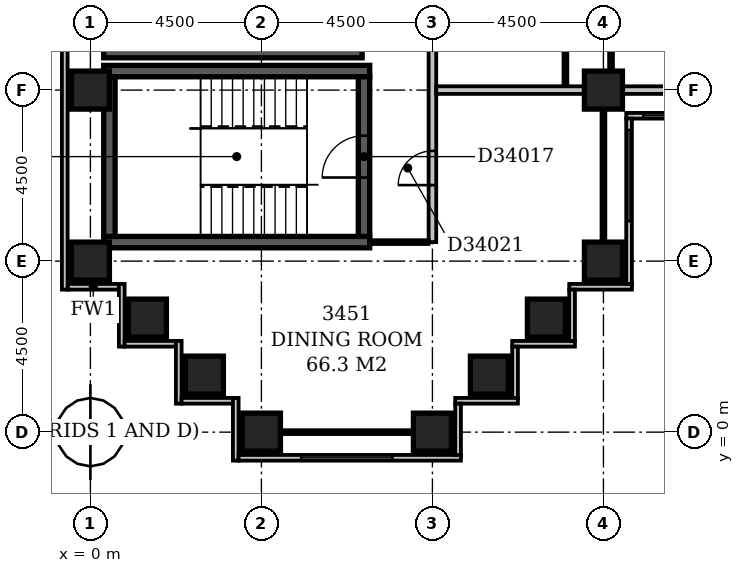
"""IFC4 building model, lengths in metres.
Left out: names, types, materials, properties, quantities, classifications, styles, units other than length and angle.
Written with IfcOpenShell. Run it as: python <this file> out.ifc"""

import sys

from ifc_helpers import new_model, si_unit, direction, frame, frame_2d, origin, origin_2d, place, context, subcontext, project, spatial, rectangle, extrude, element, fill, save


model = new_model("IFC4")
c1 = context("Model", 3, precision=1e-05, world=origin(), true_north=direction((0.0, 1.0)))
c2 = subcontext(c1, "Body", "Model", "MODEL_VIEW")
j1 = project(units=[si_unit("LENGTHUNIT", "METRE"), si_unit("PLANEANGLEUNIT", "RADIAN")], contexts=[c1])
p1 = place(None, origin())
s1 = spatial("IfcSite", under=j1, at=p1, CompositionType="ELEMENT")
p2 = place(p1, origin())
s2 = spatial("IfcBuilding", under=s1, at=p2, CompositionType="ELEMENT")
p3 = place(p2, frame((0.0, 0.0, 137.6)))
s3 = spatial("IfcBuildingStorey", under=s2, at=p3, CompositionType="ELEMENT", Elevation=137.6)
for number, where, z_axis, x_axis in (
    (1, (0.35, 5.0, -0.3), (0.0, 0.0, 1.0), (1.0, 0.0, 0.0)),
    (2, (0.35, 9.5, -0.3), (0.0, 0.0, 1.0), (1.0, 0.0, 0.0)),
):
    element("IfcWall", number, at=place(p3, frame(where, z_axis=z_axis, x_axis=x_axis)), inside=s3, PredefinedType="SHEAR", context=c2, shape_type="SweptSolid", body=[
        extrude(rectangle(XDim=7.0, YDim=0.3, at=frame_2d((3.5, 0.0))), origin(), (0.0, 0.0, 1.0), 3.6),
    ])
p4 = place(p3, frame((0.35, 10.0, -0.3), z_axis=(0.0, 0.0, 1.0), x_axis=(1.0, 0.0, 0.0)))
e3 = element("IfcWall", 3, at=p4, inside=s3, PredefinedType="SHEAR", context=c2, shape_type="SweptSolid", body=[
    extrude(rectangle(XDim=6.8, YDim=0.3, at=frame_2d((3.4, 0.0))), origin(), (0.0, 0.0, 1.0), 3.6),
])
p5 = place(p3, frame((0.5, 5.15, -0.3), z_axis=(0.0, 0.0, 1.0), x_axis=(0.0, 1.0, 0.0)))
e4 = element("IfcWall", 4, at=p5, inside=s3, PredefinedType="SHEAR", context=c2, shape_type="SweptSolid", body=[
    extrude(rectangle(XDim=4.2, YDim=0.3, at=frame_2d((2.1, 0.0))), origin(), (0.0, 0.0, 1.0), 3.6),
])
p6 = place(p3, frame((7.2, 5.15, -0.3), z_axis=(0.0, 0.0, 1.0), x_axis=(0.0, 1.0, 0.0)))
e5 = element("IfcWall", 5, at=p6, inside=s3, PredefinedType="SHEAR", context=c2, shape_type="SweptSolid", body=[
    extrude(rectangle(XDim=4.2, YDim=0.3, at=frame_2d((2.1, 0.0))), origin(), (0.0, 0.0, 1.0), 3.6),
])
p7 = place(p6, frame((1.55, 0.0, 0.3)))
e6 = element("IfcOpeningElement", 6, at=p7, cuts=e5, PredefinedType="OPENING", context=c2, shape_type="SweptSolid", body=[
    extrude(rectangle(XDim=1.1, YDim=2.1, at=frame_2d((0.55, 1.05))), frame((0.0, 0.162, 0.0), z_axis=(0.0, -1.0, 0.0), x_axis=(1.0, 0.0, 0.0)), (0.0, 0.0, 1.0), 0.324),
])
for number, where, z_axis, x_axis in (
    (7, (4.5, 0.0, -0.3), (0.0, 0.0, 1.0), (1.0, 0.0, 0.0)),
    (8, (9.0, 0.0, -0.3), (0.0, 0.0, 1.0), (1.0, 0.0, 0.0)),
    (9, (3.0, 1.5, -0.3), (0.0, 0.0, 1.0), (1.0, 0.0, 0.0)),
    (10, (10.5, 1.5, -0.3), (0.0, 0.0, 1.0), (1.0, 0.0, 0.0)),
    (11, (1.5, 3.0, -0.3), (0.0, 0.0, 1.0), (1.0, 0.0, 0.0)),
    (12, (12.0, 3.0, -0.3), (0.0, 0.0, 1.0), (1.0, 0.0, 0.0)),
    (13, (0.0, 4.5, -0.3), (0.0, 0.0, 1.0), (1.0, 0.0, 0.0)),
    (14, (13.5, 4.5, -0.3), (0.0, 0.0, 1.0), (1.0, 0.0, 0.0)),
    (15, (0.0, 9.0, -0.3), (0.0, 0.0, 1.0), (1.0, 0.0, 0.0)),
    (16, (13.5, 9.0, -0.3), (0.0, 0.0, 1.0), (1.0, 0.0, 0.0)),
):
    element("IfcColumn", number, at=place(p3, frame(where, z_axis=z_axis, x_axis=x_axis)), inside=s3, PredefinedType="COLUMN", context=c2, shape_type="SweptSolid", body=[
        extrude(rectangle(XDim=1.0, YDim=1.0, at=origin_2d()), origin(), (0.0, 0.0, 1.0), 3.6),
    ])
p8 = place(p3, frame((9.675, -0.6, 0.0), z_axis=(0.0, 0.0, 1.0), x_axis=(0.0, 1.0, 0.0)))
e17 = element("IfcWall", 17, at=p8, inside=s3, PredefinedType="STANDARD", context=c2, shape_type="SweptSolid", body=[
    extrude(rectangle(XDim=1.35, YDim=0.15, at=frame_2d((0.675, 0.0))), origin(), (0.0, 0.0, 1.0), 2.7),
])
p9 = place(p3, frame((9.6, 0.825, 0.0), z_axis=(0.0, 0.0, 1.0), x_axis=(1.0, 0.0, 0.0)))
e18 = element("IfcWall", 18, at=p9, inside=s3, PredefinedType="STANDARD", context=c2, shape_type="SweptSolid", body=[
    extrude(rectangle(XDim=1.65, YDim=0.15, at=frame_2d((0.825, 0.0))), origin(), (0.0, 0.0, 1.0), 2.7),
])
p10 = place(p3, frame((11.175, 0.9, 0.0), z_axis=(0.0, 0.0, 1.0), x_axis=(0.0, 1.0, 0.0)))
e19 = element("IfcWall", 19, at=p10, inside=s3, PredefinedType="STANDARD", context=c2, shape_type="SweptSolid", body=[
    extrude(rectangle(XDim=1.35, YDim=0.15, at=frame_2d((0.675, 0.0))), origin(), (0.0, 0.0, 1.0), 2.7),
])
p11 = place(p3, frame((11.1, 2.325, 0.0), z_axis=(0.0, 0.0, 1.0), x_axis=(1.0, 0.0, 0.0)))
e20 = element("IfcWall", 20, at=p11, inside=s3, PredefinedType="STANDARD", context=c2, shape_type="SweptSolid", body=[
    extrude(rectangle(XDim=1.65, YDim=0.15, at=frame_2d((0.825, 0.0))), origin(), (0.0, 0.0, 1.0), 2.7),
])
p12 = place(p3, frame((12.675, 2.4, 0.0), z_axis=(0.0, 0.0, 1.0), x_axis=(0.0, 1.0, 0.0)))
e21 = element("IfcWall", 21, at=p12, inside=s3, PredefinedType="STANDARD", context=c2, shape_type="SweptSolid", body=[
    extrude(rectangle(XDim=1.35, YDim=0.15, at=frame_2d((0.675, 0.0))), origin(), (0.0, 0.0, 1.0), 2.7),
])
p13 = place(p3, frame((12.6, 3.825, 0.0), z_axis=(0.0, 0.0, 1.0), x_axis=(1.0, 0.0, 0.0)))
e22 = element("IfcWall", 22, at=p13, inside=s3, PredefinedType="STANDARD", context=c2, shape_type="SweptSolid", body=[
    extrude(rectangle(XDim=1.65, YDim=0.15, at=frame_2d((0.825, 0.0))), origin(), (0.0, 0.0, 1.0), 2.7),
])
p14 = place(p3, frame((14.175, 3.9, 0.0), z_axis=(0.0, 0.0, 1.0), x_axis=(0.0, 1.0, 0.0)))
e23 = element("IfcWall", 23, at=p14, inside=s3, PredefinedType="STANDARD", context=c2, shape_type="SweptSolid", body=[
    extrude(rectangle(XDim=4.35, YDim=0.15, at=frame_2d((2.175, 0.0))), origin(), (0.0, 0.0, 1.0), 2.7),
])
p15 = place(p14, frame((1.65, 0.0, 0.6)))
e24 = element("IfcOpeningElement", 24, at=p15, cuts=e23, PredefinedType="OPENING", context=c2, shape_type="SweptSolid", body=[
    extrude(rectangle(XDim=2.4, YDim=1.8, at=frame_2d((1.2, 0.9))), frame((0.0, 0.087, 0.0), z_axis=(0.0, -1.0, 0.0), x_axis=(1.0, 0.0, 0.0)), (0.0, 0.0, 1.0), 0.174),
])
p16 = place(p3, frame((14.1, 8.325, 0.0), z_axis=(0.0, 0.0, 1.0), x_axis=(1.0, 0.0, 0.0)))
e25 = element("IfcWall", 25, at=p16, inside=s3, PredefinedType="STANDARD", context=c2, shape_type="SweptSolid", body=[
    extrude(rectangle(XDim=4.65, YDim=0.15, at=frame_2d((2.325, 0.0))), origin(), (0.0, 0.0, 1.0), 2.7),
])
p17 = place(p16, frame((0.45, 0.0, 0.6)))
e26 = element("IfcOpeningElement", 26, at=p17, cuts=e25, PredefinedType="OPENING", context=c2, shape_type="SweptSolid", body=[
    extrude(rectangle(XDim=2.4, YDim=1.8, at=frame_2d((1.2, 0.9))), frame((0.0, 0.087, 0.0), z_axis=(0.0, -1.0, 0.0), x_axis=(1.0, 0.0, 0.0)), (0.0, 0.0, 1.0), 0.174),
])
p18 = place(p3, frame((-0.675, 59.1, 0.0), z_axis=(0.0, 0.0, 1.0), x_axis=(0.0, -1.0, 0.0)))
e27 = element("IfcWall", 27, at=p18, inside=s3, PredefinedType="STANDARD", context=c2, shape_type="SweptSolid", body=[
    extrude(rectangle(XDim=55.35, YDim=0.15, at=frame_2d((27.675, 0.0))), origin(), (0.0, 0.0, 1.0), 2.7),
])
p19 = place(p3, frame((-0.6, 3.825, 0.0), z_axis=(0.0, 0.0, 1.0), x_axis=(1.0, 0.0, 0.0)))
e28 = element("IfcWall", 28, at=p19, inside=s3, PredefinedType="STANDARD", context=c2, shape_type="SweptSolid", body=[
    extrude(rectangle(XDim=1.35, YDim=0.15, at=frame_2d((0.675, 0.0))), origin(), (0.0, 0.0, 1.0), 2.7),
])
p20 = place(p3, frame((0.825, 3.9, 0.0), z_axis=(0.0, 0.0, 1.0), x_axis=(0.0, -1.0, 0.0)))
e29 = element("IfcWall", 29, at=p20, inside=s3, PredefinedType="STANDARD", context=c2, shape_type="SweptSolid", body=[
    extrude(rectangle(XDim=1.65, YDim=0.15, at=frame_2d((0.825, 0.0))), origin(), (0.0, 0.0, 1.0), 2.7),
])
p21 = place(p3, frame((0.9, 2.325, 0.0), z_axis=(0.0, 0.0, 1.0), x_axis=(1.0, 0.0, 0.0)))
e30 = element("IfcWall", 30, at=p21, inside=s3, PredefinedType="STANDARD", context=c2, shape_type="SweptSolid", body=[
    extrude(rectangle(XDim=1.35, YDim=0.15, at=frame_2d((0.675, 0.0))), origin(), (0.0, 0.0, 1.0), 2.7),
])
p22 = place(p3, frame((2.325, 2.4, 0.0), z_axis=(0.0, 0.0, 1.0), x_axis=(0.0, -1.0, 0.0)))
e31 = element("IfcWall", 31, at=p22, inside=s3, PredefinedType="STANDARD", context=c2, shape_type="SweptSolid", body=[
    extrude(rectangle(XDim=1.65, YDim=0.15, at=frame_2d((0.825, 0.0))), origin(), (0.0, 0.0, 1.0), 2.7),
])
p23 = place(p3, frame((2.4, 0.825, 0.0), z_axis=(0.0, 0.0, 1.0), x_axis=(1.0, 0.0, 0.0)))
e32 = element("IfcWall", 32, at=p23, inside=s3, PredefinedType="STANDARD", context=c2, shape_type="SweptSolid", body=[
    extrude(rectangle(XDim=1.35, YDim=0.15, at=frame_2d((0.675, 0.0))), origin(), (0.0, 0.0, 1.0), 2.7),
])
p24 = place(p3, frame((3.825, 0.9, 0.0), z_axis=(0.0, 0.0, 1.0), x_axis=(0.0, -1.0, 0.0)))
e33 = element("IfcWall", 33, at=p24, inside=s3, PredefinedType="STANDARD", context=c2, shape_type="SweptSolid", body=[
    extrude(rectangle(XDim=1.65, YDim=0.15, at=frame_2d((0.825, 0.0))), origin(), (0.0, 0.0, 1.0), 2.7),
])
p25 = place(p3, frame((3.9, -0.675, 0.0), z_axis=(0.0, 0.0, 1.0), x_axis=(1.0, 0.0, 0.0)))
e34 = element("IfcWall", 34, at=p25, inside=s3, PredefinedType="STANDARD", context=c2, shape_type="SweptSolid", body=[
    extrude(rectangle(XDim=5.85, YDim=0.15, at=frame_2d((2.925, 0.0))), origin(), (0.0, 0.0, 1.0), 2.7),
])
p26 = place(p25, frame((1.65, 0.0, 0.6)))
e35 = element("IfcOpeningElement", 35, at=p26, cuts=e34, PredefinedType="OPENING", context=c2, shape_type="SweptSolid", body=[
    extrude(rectangle(XDim=2.4, YDim=1.8, at=frame_2d((1.2, 0.9))), frame((0.0, 0.087, 0.0), z_axis=(0.0, -1.0, 0.0), x_axis=(1.0, 0.0, 0.0)), (0.0, 0.0, 1.0), 0.174),
])
p27 = place(p3, frame((5.0, 0.0, 0.0), z_axis=(0.0, 0.0, 1.0), x_axis=(1.0, 0.0, 0.0)))
e36 = element("IfcWall", 36, at=p27, inside=s3, PredefinedType="PARTITIONING", context=c2, shape_type="SweptSolid", body=[
    extrude(rectangle(XDim=3.5, YDim=0.1, at=frame_2d((1.75, 0.0))), origin(), (0.0, 0.0, 1.0), 2.7),
])
p28 = place(p3, frame((0.0, 4.5, 0.0), z_axis=(0.0, 0.0, 1.0), x_axis=(0.0, 1.0, 0.0)))
e37 = element("IfcWall", 37, at=p28, inside=s3, PredefinedType="PARTITIONING", context=c2, shape_type="SweptSolid", body=[
    extrude(rectangle(XDim=0.5, YDim=0.1, at=frame_2d((0.25, 0.0))), origin(), (0.0, 0.0, 1.0), 2.7),
])
p29 = place(p3, frame((7.349, 5.0, 0.0), z_axis=(0.0, 0.0, 1.0), x_axis=(1.0, 0.0, 0.0)))
e38 = element("IfcWall", 38, at=p29, inside=s3, PredefinedType="PARTITIONING", context=c2, shape_type="SweptSolid", body=[
    extrude(rectangle(XDim=1.551, YDim=0.1, at=frame_2d((0.775, 0.0))), origin(), (0.0, 0.0, 1.0), 3.3),
])
p30 = place(p3, frame((9.0, 5.0, 0.0), z_axis=(0.0, 0.0, 1.0), x_axis=(0.0, 1.0, 0.0)))
e39 = element("IfcWall", 39, at=p30, inside=s3, PredefinedType="PARTITIONING", context=c2, shape_type="SweptSolid", body=[
    extrude(rectangle(XDim=27.75, YDim=0.2, at=frame_2d((13.875, 0.0))), origin(), (0.0, 0.0, 1.0), 3.3),
])
p31 = place(p30, frame((17.8, 0.0, 0.0)))
e40 = element("IfcOpeningElement", 40, at=p31, cuts=e39, PredefinedType="OPENING", context=c2, shape_type="SweptSolid", body=[
    extrude(rectangle(XDim=1.0, YDim=2.1, at=frame_2d((0.5, 1.05))), frame((0.0, 0.112, 0.0), z_axis=(0.0, -1.0, 0.0), x_axis=(1.0, 0.0, 0.0)), (0.0, 0.0, 1.0), 0.224),
])
p32 = place(p30, frame((14.95, 0.0, 0.0)))
e41 = element("IfcOpeningElement", 41, at=p32, cuts=e39, PredefinedType="OPENING", context=c2, shape_type="SweptSolid", body=[
    extrude(rectangle(XDim=1.0, YDim=2.1, at=frame_2d((0.5, 1.05))), frame((0.0, 0.112, 0.0), z_axis=(0.0, -1.0, 0.0), x_axis=(1.0, 0.0, 0.0)), (0.0, 0.0, 1.0), 0.224),
])
p33 = place(p30, frame((11.7, 0.0, 0.0)))
e42 = element("IfcOpeningElement", 42, at=p33, cuts=e39, PredefinedType="OPENING", context=c2, shape_type="SweptSolid", body=[
    extrude(rectangle(XDim=1.0, YDim=2.1, at=frame_2d((0.5, 1.05))), frame((0.0, 0.112, 0.0), z_axis=(0.0, -1.0, 0.0), x_axis=(1.0, 0.0, 0.0)), (0.0, 0.0, 1.0), 0.224),
])
p34 = place(p30, frame((1.5, 0.0, 0.0)))
e43 = element("IfcOpeningElement", 43, at=p34, cuts=e39, PredefinedType="OPENING", context=c2, shape_type="SweptSolid", body=[
    extrude(rectangle(XDim=0.9, YDim=2.1, at=frame_2d((0.45, 1.05))), frame((0.0, 0.112, 0.0), z_axis=(0.0, -1.0, 0.0), x_axis=(1.0, 0.0, 0.0)), (0.0, 0.0, 1.0), 0.224),
])
p35 = place(p3, frame((13.5, 5.0, 0.0), z_axis=(0.0, 0.0, 1.0), x_axis=(0.0, 1.0, 0.0)))
e44 = element("IfcWall", 44, at=p35, inside=s3, PredefinedType="PARTITIONING", context=c2, shape_type="SweptSolid", body=[
    extrude(rectangle(XDim=3.5, YDim=0.1, at=frame_2d((1.75, 0.0))), origin(), (0.0, 0.0, 1.0), 2.7),
])
p36 = place(p3, frame((9.1, 9.0, 0.0), z_axis=(0.0, 0.0, 1.0), x_axis=(1.0, 0.0, 0.0)))
e45 = element("IfcWall", 45, at=p36, inside=s3, PredefinedType="PARTITIONING", context=c2, shape_type="SweptSolid", body=[
    extrude(rectangle(XDim=3.9, YDim=0.2, at=frame_2d((1.95, 0.0))), origin(), (0.0, 0.0, 1.0), 3.3),
])
p37 = place(p3, frame((14.0, 9.0, 0.0), z_axis=(0.0, 0.0, 1.0), x_axis=(1.0, 0.0, 0.0)))
e46 = element("IfcWall", 46, at=p37, inside=s3, PredefinedType="PARTITIONING", context=c2, shape_type="SweptSolid", body=[
    extrude(rectangle(XDim=3.5, YDim=0.2, at=frame_2d((1.75, 0.0))), origin(), (0.0, 0.0, 1.0), 2.7),
])
p38 = place(p3, frame((12.5, 9.1, 0.0), z_axis=(0.0, 0.0, 1.0), x_axis=(0.0, 1.0, 0.0)))
e47 = element("IfcWall", 47, at=p38, inside=s3, PredefinedType="PARTITIONING", context=c2, shape_type="SweptSolid", body=[
    extrude(rectangle(XDim=7.3, YDim=0.1, at=frame_2d((3.65, 0.0))), origin(), (0.0, 0.0, 1.0), 3.3),
])
p39 = place(p38, frame((5.7, 0.0, 0.0)))
e48 = element("IfcOpeningElement", 48, at=p39, cuts=e47, PredefinedType="OPENING", context=c2, shape_type="SweptSolid", body=[
    extrude(rectangle(XDim=0.8, YDim=2.1, at=frame_2d((0.4, 1.05))), frame((0.0, 0.062, 0.0), z_axis=(0.0, -1.0, 0.0), x_axis=(1.0, 0.0, 0.0)), (0.0, 0.0, 1.0), 0.124),
])
p40 = place(p38, frame((1.95, 0.0, 0.0)))
e49 = element("IfcOpeningElement", 49, at=p40, cuts=e47, PredefinedType="OPENING", context=c2, shape_type="SweptSolid", body=[
    extrude(rectangle(XDim=0.9, YDim=2.1, at=frame_2d((0.45, 1.05))), frame((0.0, 0.062, 0.0), z_axis=(0.0, -1.0, 0.0), x_axis=(1.0, 0.0, 0.0)), (0.0, 0.0, 1.0), 0.124),
])
p41 = place(p3, frame((13.7, 9.5, 0.0), z_axis=(0.0, 0.0, 1.0), x_axis=(0.0, 1.0, 0.0)))
e50 = element("IfcWall", 50, at=p41, inside=s3, PredefinedType="PARTITIONING", context=c2, shape_type="SweptSolid", body=[
    extrude(rectangle(XDim=8.4, YDim=0.1, at=frame_2d((4.2, 0.0))), origin(), (0.0, 0.0, 1.0), 3.3),
])
p42 = place(p41, frame((1.3, 0.0, 0.0)))
e51 = element("IfcOpeningElement", 51, at=p42, cuts=e50, PredefinedType="OPENING", context=c2, shape_type="SweptSolid", body=[
    extrude(rectangle(XDim=0.9, YDim=2.1, at=frame_2d((0.45, 1.05))), frame((0.0, 0.062, 0.0), z_axis=(0.0, -1.0, 0.0), x_axis=(1.0, 0.0, 0.0)), (0.0, 0.0, 1.0), 0.124),
])
p43 = place(p41, frame((5.8, 0.0, 0.0)))
e52 = element("IfcOpeningElement", 52, at=p43, cuts=e50, PredefinedType="OPENING", context=c2, shape_type="SweptSolid", body=[
    extrude(rectangle(XDim=0.9, YDim=2.1, at=frame_2d((0.45, 1.05))), frame((0.0, 0.062, 0.0), z_axis=(0.0, -1.0, 0.0), x_axis=(1.0, 0.0, 0.0)), (0.0, 0.0, 1.0), 0.124),
])
p44 = place(p15, origin())
e53 = element("IfcWindow", 53, at=p44, inside=s3, PartitioningType="SINGLE_PANEL", PredefinedType="WINDOW", context=c2, shape_type="SweptSolid", body=[
    extrude(rectangle(XDim=2.4, YDim=1.8, at=frame_2d((1.2, 0.9))), frame((0.0, 0.03, 0.0), z_axis=(0.0, -1.0, 0.0), x_axis=(1.0, 0.0, 0.0)), (0.0, 0.0, 1.0), 0.06),
])
fill(e24, e53)
p45 = place(p17, origin())
e54 = element("IfcWindow", 54, at=p45, inside=s3, PartitioningType="SINGLE_PANEL", PredefinedType="WINDOW", context=c2, shape_type="SweptSolid", body=[
    extrude(rectangle(XDim=2.4, YDim=1.8, at=frame_2d((1.2, 0.9))), frame((0.0, 0.03, 0.0), z_axis=(0.0, -1.0, 0.0), x_axis=(1.0, 0.0, 0.0)), (0.0, 0.0, 1.0), 0.06),
])
fill(e26, e54)
p46 = place(p26, origin())
e55 = element("IfcWindow", 55, at=p46, inside=s3, PartitioningType="SINGLE_PANEL", PredefinedType="WINDOW", context=c2, shape_type="SweptSolid", body=[
    extrude(rectangle(XDim=2.4, YDim=1.8, at=frame_2d((1.2, 0.9))), frame((0.0, 0.03, 0.0), z_axis=(0.0, -1.0, 0.0), x_axis=(1.0, 0.0, 0.0)), (0.0, 0.0, 1.0), 0.06),
])
fill(e35, e55)
p47 = place(p7, origin())
e56 = element("IfcDoor", 56, at=p47, inside=s3, OperationType="SINGLE_SWING_LEFT", PredefinedType="DOOR", context=c2, shape_type="SweptSolid", body=[
    extrude(rectangle(XDim=1.1, YDim=2.1, at=frame_2d((0.55, 1.05))), frame((0.0, 0.025, 0.0), z_axis=(0.0, -1.0, 0.0), x_axis=(1.0, 0.0, 0.0)), (0.0, 0.0, 1.0), 0.05),
])
fill(e6, e56)
p48 = place(p34, origin())
e57 = element("IfcDoor", 57, at=p48, inside=s3, OperationType="SINGLE_SWING_LEFT", PredefinedType="DOOR", context=c2, shape_type="SweptSolid", body=[
    extrude(rectangle(XDim=0.9, YDim=2.1, at=frame_2d((0.45, 1.05))), frame((0.0, 0.025, 0.0), z_axis=(0.0, -1.0, 0.0), x_axis=(1.0, 0.0, 0.0)), (0.0, 0.0, 1.0), 0.05),
])
fill(e43, e57)
save(model, sys.argv[1])
